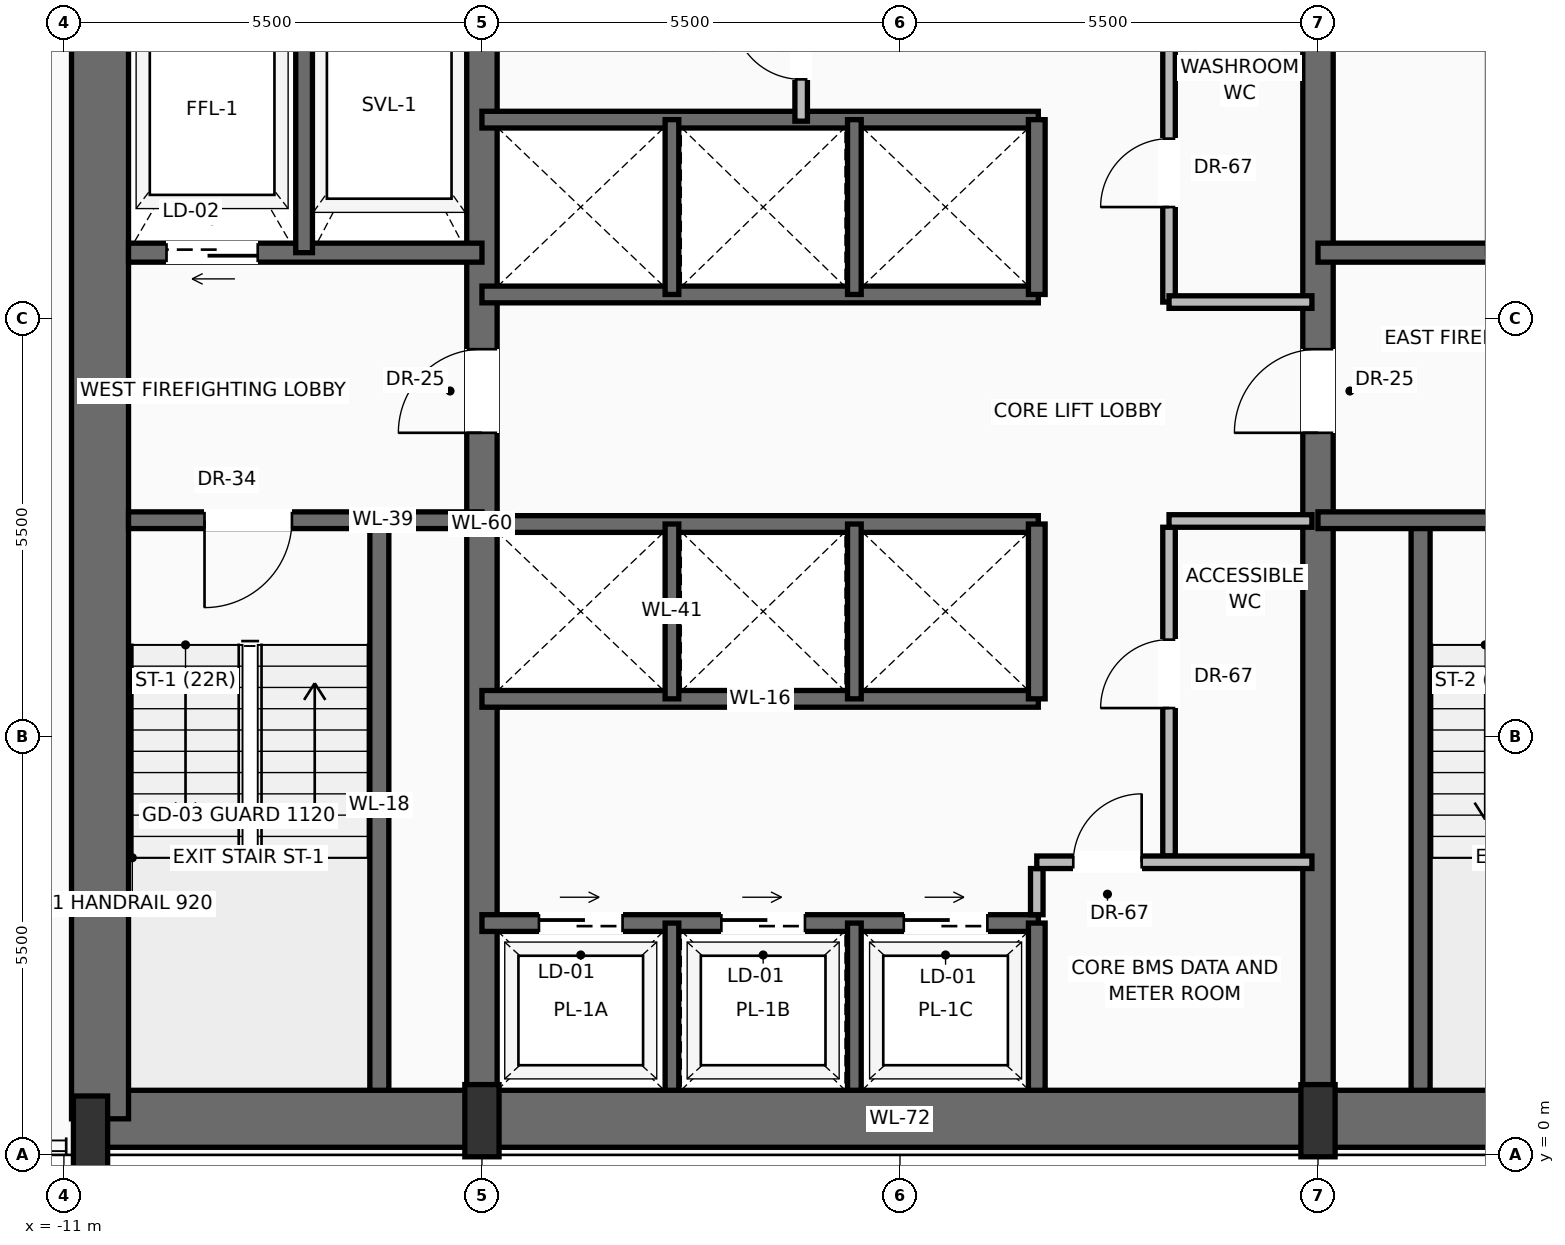
"""IFC4 building model, lengths in metres.
Left out: names, types, materials, properties, quantities, classifications, styles, units other than length and angle.
Written with IfcOpenShell. Run it as: python <this file> out.ifc"""

import sys

from ifc_helpers import new_model, si_unit, direction, frame, frame_2d, origin, origin_2d, place, context, subcontext, project, spatial, rectangle, extrude, source, transform, mapped, element, fill, save


model = new_model("IFC4")
c1 = context("Model", 3, precision=1e-05, world=origin(), true_north=direction((0.0, 1.0)))
c2 = subcontext(c1, "Body", "Model", "MODEL_VIEW")
j1 = project(units=[si_unit("LENGTHUNIT", "METRE"), si_unit("PLANEANGLEUNIT", "RADIAN")], contexts=[c1])
p1 = place(None, origin())
s1 = spatial("IfcSite", under=j1, at=p1, CompositionType="ELEMENT")
p2 = place(p1, origin())
s2 = spatial("IfcBuilding", under=s1, at=p2, CompositionType="ELEMENT")
p3 = place(p2, frame((0.0, 0.0, 117.3)))
s3 = spatial("IfcBuildingStorey", under=s2, at=p3, CompositionType="ELEMENT", Elevation=117.3)
p4 = place(p3, frame((-10.65, 0.475, 0.0), z_axis=(0.0, 0.0, 1.0), x_axis=(1.0, 0.0, 0.0)))
e1 = element("IfcWall", 1, at=p4, inside=s3, PredefinedType="SHEAR", context=c2, shape_type="SweptSolid", body=[
    extrude(rectangle(XDim=21.3, YDim=0.75, at=frame_2d((10.65, 0.0))), origin(), (0.0, 0.0, 1.0), 3.42),
])
p5 = place(p3, frame((-10.525, 0.475, 0.0), z_axis=(0.0, 0.0, 1.0), x_axis=(0.0, 1.0, 0.0)))
e2 = element("IfcWall", 2, at=p5, inside=s3, PredefinedType="SHEAR", context=c2, shape_type="SweptSolid", body=[
    extrude(rectangle(XDim=15.65, YDim=0.75, at=frame_2d((7.825, 0.0))), origin(), (0.0, 0.0, 1.0), 3.42),
])
p6 = place(p3, frame((-5.5, 0.475, 0.0), z_axis=(0.0, 0.0, 1.0), x_axis=(0.0, 1.0, 0.0)))
e3 = element("IfcWall", 3, at=p6, inside=s3, PredefinedType="SHEAR", context=c2, shape_type="SweptSolid", body=[
    extrude(rectangle(XDim=15.65, YDim=0.4, at=frame_2d((7.825, 0.0))), origin(), (0.0, 0.0, 1.0), 3.42),
])
p7 = place(p6, frame((9.025, 0.0, 0.0)))
e4 = element("IfcOpeningElement", 4, at=p7, cuts=e3, PredefinedType="OPENING", context=c2, shape_type="SweptSolid", body=[
    extrude(rectangle(XDim=1.1, YDim=2.2, at=frame_2d((0.55, 1.1))), frame((0.0, 0.21, 0.0), z_axis=(0.0, -1.0, 0.0), x_axis=(1.0, 0.0, 0.0)), (0.0, 0.0, 1.0), 0.42),
])
p8 = place(p3, frame((5.5, 0.475, 0.0), z_axis=(0.0, 0.0, 1.0), x_axis=(0.0, 1.0, 0.0)))
e5 = element("IfcWall", 5, at=p8, inside=s3, PredefinedType="SHEAR", context=c2, shape_type="SweptSolid", body=[
    extrude(rectangle(XDim=15.65, YDim=0.4, at=frame_2d((7.825, 0.0))), origin(), (0.0, 0.0, 1.0), 3.42),
])
p9 = place(p8, frame((9.025, 0.0, 0.0)))
e6 = element("IfcOpeningElement", 6, at=p9, cuts=e5, PredefinedType="OPENING", context=c2, shape_type="SweptSolid", body=[
    extrude(rectangle(XDim=1.1, YDim=2.2, at=frame_2d((0.55, 1.1))), frame((0.0, 0.21, 0.0), z_axis=(0.0, -1.0, 0.0), x_axis=(1.0, 0.0, 0.0)), (0.0, 0.0, 1.0), 0.42),
])
m1 = source(origin(), c2, "Body", "SweptSolid", [
    extrude(rectangle(XDim=0.45, YDim=0.95, at=origin_2d()), origin(), (0.0, 0.0, 1.0), 3.7),
])
for number, where, z_axis, x_axis in (
    (7, (-10.65, 0.3, 0.0), (0.0, 0.0, 1.0), (1.0, 0.0, 0.0)),
    (8, (-5.5, 0.45, 0.0), (0.0, 0.0, 1.0), (1.0, 0.0, 0.0)),
    (9, (5.5, 0.45, 0.0), (0.0, 0.0, 1.0), (1.0, 0.0, 0.0)),
):
    element("IfcColumn", number, at=place(p3, frame(where, z_axis=z_axis, x_axis=x_axis)), inside=s3, PredefinedType="PILASTER", context=c2, shape_type="MappedRepresentation", body=[
        mapped(m1, transform((0.0, 0.0, 0.0), scale=1.0)),
    ])
p10 = place(p3, frame((-6.85, 0.85, 0.0), z_axis=(0.0, 0.0, 1.0), x_axis=(0.0, 1.0, 0.0)))
e10 = element("IfcWall", 10, at=p10, inside=s3, PredefinedType="SOLIDWALL", context=c2, shape_type="SweptSolid", body=[
    extrude(rectangle(XDim=7.5, YDim=0.25, at=frame_2d((3.75, 0.0))), origin(), (0.0, 0.0, 1.0), 3.42),
])
p11 = place(p3, frame((-5.5, 8.35, 0.0), z_axis=(0.0, 0.0, 1.0), x_axis=(-1.0, 0.0, 0.0)))
e11 = element("IfcWall", 11, at=p11, inside=s3, PredefinedType="SOLIDWALL", context=c2, shape_type="SweptSolid", body=[
    extrude(rectangle(XDim=4.65, YDim=0.22, at=frame_2d((2.325, 0.0))), origin(), (0.0, 0.0, 1.0), 3.42),
])
p12 = place(p11, frame((2.5, 0.0, 0.0)))
e12 = element("IfcOpeningElement", 12, at=p12, cuts=e11, PredefinedType="OPENING", context=c2, shape_type="SweptSolid", body=[
    extrude(rectangle(XDim=1.15, YDim=2.2, at=frame_2d((0.575, 1.1))), frame((0.0, 0.12, 0.0), z_axis=(0.0, -1.0, 0.0), x_axis=(1.0, 0.0, 0.0)), (0.0, 0.0, 1.0), 0.24),
])
p13 = place(p3, frame((-5.5, 11.87, 0.0), z_axis=(0.0, 0.0, 1.0), x_axis=(-1.0, 0.0, 0.0)))
e13 = element("IfcWall", 13, at=p13, inside=s3, PredefinedType="SOLIDWALL", context=c2, shape_type="SweptSolid", body=[
    extrude(rectangle(XDim=4.65, YDim=0.25, at=frame_2d((2.325, 0.0))), origin(), (0.0, 0.0, 1.0), 3.42),
])
p14 = place(p13, frame((2.95, 0.0, 0.0)))
e14 = element("IfcOpeningElement", 14, at=p14, cuts=e13, PredefinedType="OPENING", context=c2, shape_type="SweptSolid", body=[
    extrude(rectangle(XDim=1.2, YDim=2.25, at=frame_2d((0.6, 1.125))), frame((0.0, 0.135, 0.0), z_axis=(0.0, -1.0, 0.0), x_axis=(1.0, 0.0, 0.0)), (0.0, 0.0, 1.0), 0.27),
])
p15 = place(p3, frame((-7.84, 11.87, 0.0), z_axis=(0.0, 0.0, 1.0), x_axis=(0.0, 1.0, 0.0)))
e15 = element("IfcWall", 15, at=p15, inside=s3, PredefinedType="SOLIDWALL", context=c2, shape_type="SweptSolid", body=[
    extrude(rectangle(XDim=3.88, YDim=0.22, at=frame_2d((1.94, 0.0))), origin(), (0.0, 0.0, 1.0), 3.42),
])
p16 = place(p3, frame((6.85, 0.85, 0.0), z_axis=(0.0, 0.0, 1.0), x_axis=(0.0, 1.0, 0.0)))
e16 = element("IfcWall", 16, at=p16, inside=s3, PredefinedType="SOLIDWALL", context=c2, shape_type="SweptSolid", body=[
    extrude(rectangle(XDim=7.5, YDim=0.25, at=frame_2d((3.75, 0.0))), origin(), (0.0, 0.0, 1.0), 3.42),
])
p17 = place(p3, frame((10.15, 8.35, 0.0), z_axis=(0.0, 0.0, 1.0), x_axis=(-1.0, 0.0, 0.0)))
e17 = element("IfcWall", 17, at=p17, inside=s3, PredefinedType="SOLIDWALL", context=c2, shape_type="SweptSolid", body=[
    extrude(rectangle(XDim=4.65, YDim=0.22, at=frame_2d((2.325, 0.0))), origin(), (0.0, 0.0, 1.0), 3.42),
])
p18 = place(p17, frame((1.0, 0.0, 0.0)))
e18 = element("IfcOpeningElement", 18, at=p18, cuts=e17, PredefinedType="OPENING", context=c2, shape_type="SweptSolid", body=[
    extrude(rectangle(XDim=1.15, YDim=2.2, at=frame_2d((0.575, 1.1))), frame((0.0, 0.12, 0.0), z_axis=(0.0, -1.0, 0.0), x_axis=(1.0, 0.0, 0.0)), (0.0, 0.0, 1.0), 0.24),
])
p19 = place(p3, frame((10.15, 11.87, 0.0), z_axis=(0.0, 0.0, 1.0), x_axis=(-1.0, 0.0, 0.0)))
e19 = element("IfcWall", 19, at=p19, inside=s3, PredefinedType="SOLIDWALL", context=c2, shape_type="SweptSolid", body=[
    extrude(rectangle(XDim=4.65, YDim=0.25, at=frame_2d((2.325, 0.0))), origin(), (0.0, 0.0, 1.0), 3.42),
])
p20 = place(p19, frame((0.5, 0.0, 0.0)))
e20 = element("IfcOpeningElement", 20, at=p20, cuts=e19, PredefinedType="OPENING", context=c2, shape_type="SweptSolid", body=[
    extrude(rectangle(XDim=1.2, YDim=2.25, at=frame_2d((0.6, 1.125))), frame((0.0, 0.135, 0.0), z_axis=(0.0, -1.0, 0.0), x_axis=(1.0, 0.0, 0.0)), (0.0, 0.0, 1.0), 0.27),
])
p21 = place(p3, frame((-5.5, 3.05, 0.0), z_axis=(0.0, 0.0, 1.0), x_axis=(1.0, 0.0, 0.0)))
e21 = element("IfcWall", 21, at=p21, inside=s3, PredefinedType="SOLIDWALL", context=c2, shape_type="SweptSolid", body=[
    extrude(rectangle(XDim=7.32, YDim=0.22, at=frame_2d((3.66, 0.0))), origin(), (0.0, 0.0, 1.0), 3.42),
])
p22 = place(p21, frame((0.75, 0.0, 0.0)))
e22 = element("IfcOpeningElement", 22, at=p22, cuts=e21, PredefinedType="OPENING", context=c2, shape_type="SweptSolid", body=[
    extrude(rectangle(XDim=1.1, YDim=2.2, at=frame_2d((0.55, 1.1))), frame((0.0, 0.12, 0.0), z_axis=(0.0, -1.0, 0.0), x_axis=(1.0, 0.0, 0.0)), (0.0, 0.0, 1.0), 0.24),
])
p23 = place(p21, frame((3.15, 0.0, 0.0)))
e23 = element("IfcOpeningElement", 23, at=p23, cuts=e21, PredefinedType="OPENING", context=c2, shape_type="SweptSolid", body=[
    extrude(rectangle(XDim=1.1, YDim=2.2, at=frame_2d((0.55, 1.1))), frame((0.0, 0.12, 0.0), z_axis=(0.0, -1.0, 0.0), x_axis=(1.0, 0.0, 0.0)), (0.0, 0.0, 1.0), 0.24),
])
p24 = place(p21, frame((5.55, 0.0, 0.0)))
e24 = element("IfcOpeningElement", 24, at=p24, cuts=e21, PredefinedType="OPENING", context=c2, shape_type="SweptSolid", body=[
    extrude(rectangle(XDim=1.1, YDim=2.2, at=frame_2d((0.55, 1.1))), frame((0.0, 0.12, 0.0), z_axis=(0.0, -1.0, 0.0), x_axis=(1.0, 0.0, 0.0)), (0.0, 0.0, 1.0), 0.24),
])
p25 = place(p3, frame((1.8, 0.85, 0.0), z_axis=(0.0, 0.0, 1.0), x_axis=(0.0, 1.0, 0.0)))
e25 = element("IfcWall", 25, at=p25, inside=s3, PredefinedType="SOLIDWALL", context=c2, shape_type="SweptSolid", body=[
    extrude(rectangle(XDim=2.2, YDim=0.22, at=frame_2d((1.1, 0.0))), origin(), (0.0, 0.0, 1.0), 3.42),
])
for number, where, z_axis, x_axis in (
    (26, (-3.0, 0.85, 0.0), (0.0, 0.0, 1.0), (0.0, 1.0, 0.0)),
    (27, (-0.6, 0.85, 0.0), (0.0, 0.0, 1.0), (0.0, 1.0, 0.0)),
):
    element("IfcWall", number, at=place(p3, frame(where, z_axis=z_axis, x_axis=x_axis)), inside=s3, PredefinedType="SOLIDWALL", context=c2, shape_type="SweptSolid", body=[
        extrude(rectangle(XDim=2.2, YDim=0.18, at=frame_2d((1.1, 0.0))), origin(), (0.0, 0.0, 1.0), 3.42),
    ])
p26 = place(p3, frame((1.8, 3.16, 0.0), z_axis=(0.0, 0.0, 1.0), x_axis=(0.0, 1.0, 0.0)))
e28 = element("IfcWall", 28, at=p26, inside=s3, PredefinedType="PARTITIONING", context=c2, shape_type="SweptSolid", body=[
    extrude(rectangle(XDim=0.608, YDim=0.165, at=frame_2d((0.304, 0.0))), origin(), (0.0, 0.0, 1.0), 3.412),
])
p27 = place(p3, frame((3.54, 3.933, 0.0), z_axis=(0.0, 0.0, 1.0), x_axis=(0.0, 1.0, 0.0)))
e29 = element("IfcWall", 29, at=p27, inside=s3, PredefinedType="PARTITIONING", context=c2, shape_type="SweptSolid", body=[
    extrude(rectangle(XDim=4.325, YDim=0.165, at=frame_2d((2.163, 0.0))), origin(), (0.0, 0.0, 1.0), 3.412),
])
p28 = place(p27, frame((1.946, 0.0, 0.0)))
e30 = element("IfcOpeningElement", 30, at=p28, cuts=e29, PredefinedType="OPENING", context=c2, shape_type="SweptSolid", body=[
    extrude(rectangle(XDim=0.9, YDim=2.1, at=frame_2d((0.45, 1.05))), frame((0.0, 0.093, 0.0), z_axis=(0.0, -1.0, 0.0), x_axis=(1.0, 0.0, 0.0)), (0.0, 0.0, 1.0), 0.185),
])
p29 = place(p3, frame((3.54, 8.34, 0.0), z_axis=(0.0, 0.0, 1.0), x_axis=(1.0, 0.0, 0.0)))
e31 = element("IfcWall", 31, at=p29, inside=s3, PredefinedType="PARTITIONING", context=c2, shape_type="SweptSolid", body=[
    extrude(rectangle(XDim=1.88, YDim=0.165, at=frame_2d((0.94, 0.0))), origin(), (0.0, 0.0, 1.0), 3.412),
])
p30 = place(p3, frame((1.8, 3.85, 0.0), z_axis=(0.0, 0.0, 1.0), x_axis=(1.0, 0.0, 0.0)))
e32 = element("IfcWall", 32, at=p30, inside=s3, PredefinedType="PARTITIONING", context=c2, shape_type="SweptSolid", body=[
    extrude(rectangle(XDim=3.62, YDim=0.165, at=frame_2d((1.81, 0.0))), origin(), (0.0, 0.0, 1.0), 3.412),
])
p31 = place(p30, frame((0.48, 0.0, 0.0)))
e33 = element("IfcOpeningElement", 33, at=p31, cuts=e32, PredefinedType="OPENING", context=c2, shape_type="SweptSolid", body=[
    extrude(rectangle(XDim=0.9, YDim=2.1, at=frame_2d((0.45, 1.05))), frame((0.0, 0.093, 0.0), z_axis=(0.0, -1.0, 0.0), x_axis=(1.0, 0.0, 0.0)), (0.0, 0.0, 1.0), 0.185),
])
for number, where, z_axis, x_axis in (
    (34, (-5.5, 6.0, 0.0), (0.0, 0.0, 1.0), (1.0, 0.0, 0.0)),
    (35, (-5.5, 8.3, 0.0), (0.0, 0.0, 1.0), (1.0, 0.0, 0.0)),
):
    element("IfcWall", number, at=place(p3, frame(where, z_axis=z_axis, x_axis=x_axis)), inside=s3, PredefinedType="SOLIDWALL", context=c2, shape_type="SweptSolid", body=[
        extrude(rectangle(XDim=7.32, YDim=0.22, at=frame_2d((3.66, 0.0))), origin(), (0.0, 0.0, 1.0), 3.42),
    ])
p32 = place(p3, frame((1.8, 6.0, 0.0), z_axis=(0.0, 0.0, 1.0), x_axis=(0.0, 1.0, 0.0)))
e36 = element("IfcWall", 36, at=p32, inside=s3, PredefinedType="SOLIDWALL", context=c2, shape_type="SweptSolid", body=[
    extrude(rectangle(XDim=2.3, YDim=0.22, at=frame_2d((1.15, 0.0))), origin(), (0.0, 0.0, 1.0), 3.42),
])
for number, where, z_axis, x_axis in (
    (37, (-3.0, 6.0, 0.0), (0.0, 0.0, 1.0), (0.0, 1.0, 0.0)),
    (38, (-0.6, 6.0, 0.0), (0.0, 0.0, 1.0), (0.0, 1.0, 0.0)),
):
    element("IfcWall", number, at=place(p3, frame(where, z_axis=z_axis, x_axis=x_axis)), inside=s3, PredefinedType="SOLIDWALL", context=c2, shape_type="SweptSolid", body=[
        extrude(rectangle(XDim=2.3, YDim=0.18, at=frame_2d((1.15, 0.0))), origin(), (0.0, 0.0, 1.0), 3.42),
    ])
for number, where, z_axis, x_axis in (
    (39, (-5.5, 11.32, 0.0), (0.0, 0.0, 1.0), (1.0, 0.0, 0.0)),
    (40, (-5.5, 13.62, 0.0), (0.0, 0.0, 1.0), (1.0, 0.0, 0.0)),
):
    element("IfcWall", number, at=place(p3, frame(where, z_axis=z_axis, x_axis=x_axis)), inside=s3, PredefinedType="SOLIDWALL", context=c2, shape_type="SweptSolid", body=[
        extrude(rectangle(XDim=7.32, YDim=0.22, at=frame_2d((3.66, 0.0))), origin(), (0.0, 0.0, 1.0), 3.42),
    ])
p33 = place(p3, frame((1.8, 11.32, 0.0), z_axis=(0.0, 0.0, 1.0), x_axis=(0.0, 1.0, 0.0)))
e41 = element("IfcWall", 41, at=p33, inside=s3, PredefinedType="SOLIDWALL", context=c2, shape_type="SweptSolid", body=[
    extrude(rectangle(XDim=2.3, YDim=0.22, at=frame_2d((1.15, 0.0))), origin(), (0.0, 0.0, 1.0), 3.42),
])
for number, where, z_axis, x_axis in (
    (42, (-3.0, 11.32, 0.0), (0.0, 0.0, 1.0), (0.0, 1.0, 0.0)),
    (43, (-0.6, 11.32, 0.0), (0.0, 0.0, 1.0), (0.0, 1.0, 0.0)),
):
    element("IfcWall", number, at=place(p3, frame(where, z_axis=z_axis, x_axis=x_axis)), inside=s3, PredefinedType="SOLIDWALL", context=c2, shape_type="SweptSolid", body=[
        extrude(rectangle(XDim=2.3, YDim=0.18, at=frame_2d((1.15, 0.0))), origin(), (0.0, 0.0, 1.0), 3.42),
    ])
p34 = place(p3, frame((-1.3, 13.6, 0.0), z_axis=(0.0, 0.0, 1.0), x_axis=(0.0, 1.0, 0.0)))
e44 = element("IfcWall", 44, at=p34, inside=s3, PredefinedType="PARTITIONING", context=c2, shape_type="SweptSolid", body=[
    extrude(rectangle(XDim=2.15, YDim=0.165, at=frame_2d((1.075, 0.0))), origin(), (0.0, 0.0, 1.0), 3.412),
])
p35 = place(p34, frame((0.55, 0.0, 0.0)))
e45 = element("IfcOpeningElement", 45, at=p35, cuts=e44, PredefinedType="OPENING", context=c2, shape_type="SweptSolid", body=[
    extrude(rectangle(XDim=0.9, YDim=2.1, at=frame_2d((0.45, 1.05))), frame((0.0, 0.093, 0.0), z_axis=(0.0, -1.0, 0.0), x_axis=(1.0, 0.0, 0.0)), (0.0, 0.0, 1.0), 0.185),
])
p36 = place(p3, frame((3.54, 11.22, 0.0), z_axis=(0.0, 0.0, 1.0), x_axis=(0.0, 1.0, 0.0)))
e46 = element("IfcWall", 46, at=p36, inside=s3, PredefinedType="PARTITIONING", context=c2, shape_type="SweptSolid", body=[
    extrude(rectangle(XDim=4.53, YDim=0.165, at=frame_2d((2.265, 0.0))), origin(), (0.0, 0.0, 1.0), 3.412),
])
p37 = place(p36, frame((1.25, 0.0, 0.0)))
e47 = element("IfcOpeningElement", 47, at=p37, cuts=e46, PredefinedType="OPENING", context=c2, shape_type="SweptSolid", body=[
    extrude(rectangle(XDim=0.9, YDim=2.1, at=frame_2d((0.45, 1.05))), frame((0.0, 0.093, 0.0), z_axis=(0.0, -1.0, 0.0), x_axis=(1.0, 0.0, 0.0)), (0.0, 0.0, 1.0), 0.185),
])
p38 = place(p3, frame((3.54, 11.22, 0.0), z_axis=(0.0, 0.0, 1.0), x_axis=(1.0, 0.0, 0.0)))
e48 = element("IfcWall", 48, at=p38, inside=s3, PredefinedType="PARTITIONING", context=c2, shape_type="SweptSolid", body=[
    extrude(rectangle(XDim=1.88, YDim=0.165, at=frame_2d((0.94, 0.0))), origin(), (0.0, 0.0, 1.0), 3.412),
])
m2 = source(origin(), c2, "Body", "SweptSolid", [
    extrude(rectangle(XDim=1.15, YDim=2.2, at=frame_2d((0.575, 1.1))), frame((0.0, 0.025, 0.0), z_axis=(0.0, -1.0, 0.0), x_axis=(1.0, 0.0, 0.0)), (0.0, 0.0, 1.0), 0.05),
])
p39 = place(p12, origin())
e49 = element("IfcDoor", 49, at=p39, inside=s3, OperationType="SINGLE_SWING_RIGHT", PredefinedType="DOOR", context=c2, shape_type="MappedRepresentation", body=[
    mapped(m2, transform((0.0, 0.0, 0.0), scale=1.0)),
])
fill(e12, e49)
m3 = source(origin(), c2, "Body", "SweptSolid", [
    extrude(rectangle(XDim=1.1, YDim=2.2, at=frame_2d((0.55, 1.1))), frame((0.0, 0.025, 0.0), z_axis=(0.0, -1.0, 0.0), x_axis=(1.0, 0.0, 0.0)), (0.0, 0.0, 1.0), 0.05),
])
p40 = place(p7, origin())
e50 = element("IfcDoor", 50, at=p40, inside=s3, OperationType="SINGLE_SWING_LEFT", PredefinedType="DOOR", context=c2, shape_type="MappedRepresentation", body=[
    mapped(m3, transform((0.0, 0.0, 0.0), scale=1.0)),
])
fill(e4, e50)
m4 = source(origin(), c2, "Body", "SweptSolid", [
    extrude(rectangle(XDim=1.2, YDim=2.25, at=frame_2d((0.6, 1.125))), frame((0.0, 0.025, 0.0), z_axis=(0.0, -1.0, 0.0), x_axis=(1.0, 0.0, 0.0)), (0.0, 0.0, 1.0), 0.05),
])
p41 = place(p14, origin())
e51 = element("IfcDoor", 51, at=p41, inside=s3, OperationType="SLIDING_TO_LEFT", PredefinedType="DOOR", context=c2, shape_type="MappedRepresentation", body=[
    mapped(m4, transform((0.0, 0.0, 0.0), scale=1.0)),
])
fill(e14, e51)
p42 = place(p9, origin())
e52 = element("IfcDoor", 52, at=p42, inside=s3, OperationType="SINGLE_SWING_LEFT", PredefinedType="DOOR", context=c2, shape_type="MappedRepresentation", body=[
    mapped(m3, transform((0.0, 0.0, 0.0), scale=1.0)),
])
fill(e6, e52)
m5 = source(origin(), c2, "Body", "SweptSolid", [
    extrude(rectangle(XDim=1.1, YDim=2.2, at=frame_2d((0.55, 1.1))), frame((0.0, 0.025, 0.0), z_axis=(0.0, -1.0, 0.0), x_axis=(1.0, 0.0, 0.0)), (0.0, 0.0, 1.0), 0.05),
])
p43 = place(p22, origin())
e53 = element("IfcDoor", 53, at=p43, inside=s3, OperationType="SLIDING_TO_RIGHT", PredefinedType="DOOR", context=c2, shape_type="MappedRepresentation", body=[
    mapped(m5, transform((0.0, 0.0, 0.0), scale=1.0)),
])
fill(e22, e53)
p44 = place(p23, origin())
e54 = element("IfcDoor", 54, at=p44, inside=s3, OperationType="SLIDING_TO_RIGHT", PredefinedType="DOOR", context=c2, shape_type="MappedRepresentation", body=[
    mapped(m5, transform((0.0, 0.0, 0.0), scale=1.0)),
])
fill(e23, e54)
p45 = place(p24, origin())
e55 = element("IfcDoor", 55, at=p45, inside=s3, OperationType="SLIDING_TO_RIGHT", PredefinedType="DOOR", context=c2, shape_type="MappedRepresentation", body=[
    mapped(m5, transform((0.0, 0.0, 0.0), scale=1.0)),
])
fill(e24, e55)
m6 = source(origin(), c2, "Body", "SweptSolid", [
    extrude(rectangle(XDim=0.9, YDim=2.1, at=frame_2d((0.45, 1.05))), frame((0.0, 0.025, 0.0), z_axis=(0.0, -1.0, 0.0), x_axis=(1.0, 0.0, 0.0)), (0.0, 0.0, 1.0), 0.05),
])
p46 = place(p31, origin())
e56 = element("IfcDoor", 56, at=p46, inside=s3, OperationType="SINGLE_SWING_RIGHT", PredefinedType="DOOR", context=c2, shape_type="MappedRepresentation", body=[
    mapped(m6, transform((0.0, 0.0, 0.0), scale=1.0)),
])
fill(e33, e56)
p47 = place(p28, origin())
e57 = element("IfcDoor", 57, at=p47, inside=s3, OperationType="SINGLE_SWING_LEFT", PredefinedType="DOOR", context=c2, shape_type="MappedRepresentation", body=[
    mapped(m6, transform((0.0, 0.0, 0.0), scale=1.0)),
])
fill(e30, e57)
p48 = place(p35, origin())
e58 = element("IfcDoor", 58, at=p48, inside=s3, OperationType="SINGLE_SWING_RIGHT", PredefinedType="DOOR", context=c2, shape_type="MappedRepresentation", body=[
    mapped(m6, transform((0.0, 0.0, 0.0), scale=1.0)),
])
fill(e45, e58)
p49 = place(p37, origin())
e59 = element("IfcDoor", 59, at=p49, inside=s3, OperationType="SINGLE_SWING_LEFT", PredefinedType="DOOR", context=c2, shape_type="MappedRepresentation", body=[
    mapped(m6, transform((0.0, 0.0, 0.0), scale=1.0)),
])
fill(e47, e59)
save(model, sys.argv[1])
